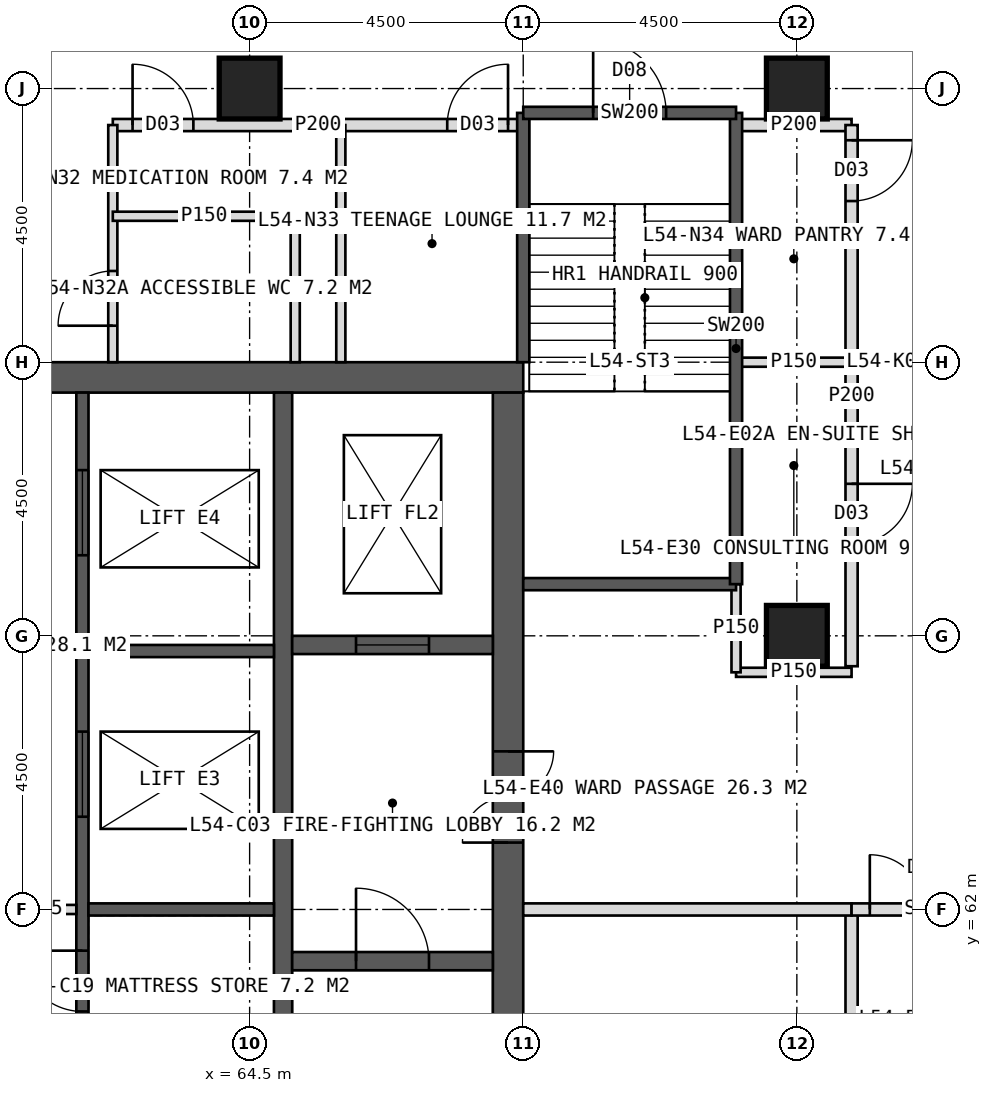
"""IFC4 building model, lengths in metres.
Left out: names, types, materials, properties, quantities, classifications, styles, units other than length and angle.
Written with IfcOpenShell. Run it as: python <this file> out.ifc"""

import sys

from ifc_helpers import new_model, si_unit, direction, frame, frame_2d, origin, origin_2d, place, context, subcontext, project, spatial, rectangle, hollow_rectangle, extrude, element, fill, save


model = new_model("IFC4")
c1 = context("Model", 3, precision=1e-05, world=origin(), true_north=direction((0.0, 1.0)))
c2 = subcontext(c1, "Body", "Model", "MODEL_VIEW")
j1 = project(units=[si_unit("LENGTHUNIT", "METRE"), si_unit("PLANEANGLEUNIT", "RADIAN")], contexts=[c1])
p1 = place(None, origin())
s1 = spatial("IfcSite", under=j1, at=p1, CompositionType="ELEMENT")
p2 = place(p1, origin())
s2 = spatial("IfcBuilding", under=s1, at=p2, CompositionType="ELEMENT")
p3 = place(p2, frame((0.0, 0.0, 225.0)))
s3 = spatial("IfcBuildingStorey", under=s2, at=p3, CompositionType="ELEMENT", Elevation=225.0)
p4 = place(p3, frame((51.0, 70.75, 0.0), z_axis=(0.0, 0.0, 1.0), x_axis=(1.0, 0.0, 0.0)))
e1 = element("IfcWall", 1, at=p4, inside=s3, PredefinedType="SHEAR", context=c2, shape_type="SweptSolid", body=[
    extrude(rectangle(XDim=18.0, YDim=0.5, at=frame_2d((9.0, 0.0))), origin(), (0.0, 0.0, 1.0), 4.0),
])
p5 = place(p4, frame((8.1, 0.0, 0.0)))
e2 = element("IfcOpeningElement", 2, at=p5, cuts=e1, PredefinedType="OPENING", context=c2, shape_type="SweptSolid", body=[
    extrude(rectangle(XDim=1.8, YDim=2.2, at=frame_2d((0.9, 1.1))), frame((0.0, 0.26, 0.0), z_axis=(0.0, -1.0, 0.0), x_axis=(1.0, 0.0, 0.0)), (0.0, 0.0, 1.0), 0.52),
])
p6 = place(p3, frame((68.75, 53.5, 0.0), z_axis=(0.0, 0.0, 1.0), x_axis=(0.0, 1.0, 0.0)))
e3 = element("IfcWall", 3, at=p6, inside=s3, PredefinedType="SHEAR", context=c2, shape_type="SweptSolid", body=[
    extrude(rectangle(XDim=17.0, YDim=0.5, at=frame_2d((8.5, 0.0))), origin(), (0.0, 0.0, 1.0), 4.0),
])
p7 = place(p6, frame((9.6, 0.0, 0.0)))
e4 = element("IfcOpeningElement", 4, at=p7, cuts=e3, PredefinedType="OPENING", context=c2, shape_type="SweptSolid", body=[
    extrude(rectangle(XDim=1.5, YDim=2.2, at=frame_2d((0.75, 1.1))), frame((0.0, 0.26, 0.0), z_axis=(0.0, -1.0, 0.0), x_axis=(1.0, 0.0, 0.0)), (0.0, 0.0, 1.0), 0.52),
])
p8 = place(p3, frame((65.05, 53.5, 0.0), z_axis=(0.0, 0.0, 1.0), x_axis=(0.0, 1.0, 0.0)))
e5 = element("IfcWall", 5, at=p8, inside=s3, PredefinedType="SHEAR", context=c2, shape_type="SweptSolid", body=[
    extrude(rectangle(XDim=17.0, YDim=0.3, at=frame_2d((8.5, 0.0))), origin(), (0.0, 0.0, 1.0), 4.0),
])
p9 = place(p3, frame((61.75, 53.5, 0.0), z_axis=(0.0, 0.0, 1.0), x_axis=(0.0, 1.0, 0.0)))
e6 = element("IfcWall", 6, at=p9, inside=s3, PredefinedType="SHEAR", context=c2, shape_type="SweptSolid", body=[
    extrude(rectangle(XDim=17.0, YDim=0.2, at=frame_2d((8.5, 0.0))), origin(), (0.0, 0.0, 1.0), 4.0),
])
p10 = place(p9, frame((0.808, 0.0, 0.0)))
e7 = element("IfcOpeningElement", 7, at=p10, cuts=e6, PredefinedType="OPENING", context=c2, shape_type="SweptSolid", body=[
    extrude(rectangle(XDim=1.0, YDim=2.1, at=frame_2d((0.5, 1.05))), frame((0.0, 0.11, 0.0), z_axis=(0.0, -1.0, 0.0), x_axis=(1.0, 0.0, 0.0)), (0.0, 0.0, 1.0), 0.22),
])
p11 = place(p9, frame((2.958, 0.0, 0.0)))
e8 = element("IfcOpeningElement", 8, at=p11, cuts=e6, PredefinedType="OPENING", context=c2, shape_type="SweptSolid", body=[
    extrude(rectangle(XDim=1.0, YDim=2.1, at=frame_2d((0.5, 1.05))), frame((0.0, 0.11, 0.0), z_axis=(0.0, -1.0, 0.0), x_axis=(1.0, 0.0, 0.0)), (0.0, 0.0, 1.0), 0.22),
])
p12 = place(p9, frame((4.722, 0.0, 0.0)))
e9 = element("IfcOpeningElement", 9, at=p12, cuts=e6, PredefinedType="OPENING", context=c2, shape_type="SweptSolid", body=[
    extrude(rectangle(XDim=1.0, YDim=2.1, at=frame_2d((0.5, 1.05))), frame((0.0, 0.11, 0.0), z_axis=(0.0, -1.0, 0.0), x_axis=(1.0, 0.0, 0.0)), (0.0, 0.0, 1.0), 0.22),
])
p13 = place(p9, frame((6.823, 0.0, 0.0)))
e10 = element("IfcOpeningElement", 10, at=p13, cuts=e6, PredefinedType="OPENING", context=c2, shape_type="SweptSolid", body=[
    extrude(rectangle(XDim=1.0, YDim=2.1, at=frame_2d((0.5, 1.05))), frame((0.0, 0.11, 0.0), z_axis=(0.0, -1.0, 0.0), x_axis=(1.0, 0.0, 0.0)), (0.0, 0.0, 1.0), 0.22),
])
p14 = place(p9, frame((10.025, 0.0, 0.0)))
e11 = element("IfcOpeningElement", 11, at=p14, cuts=e6, PredefinedType="OPENING", context=c2, shape_type="SweptSolid", body=[
    extrude(rectangle(XDim=1.4, YDim=2.2, at=frame_2d((0.7, 1.1))), frame((0.0, 0.11, 0.0), z_axis=(0.0, -1.0, 0.0), x_axis=(1.0, 0.0, 0.0)), (0.0, 0.0, 1.0), 0.22),
])
p15 = place(p9, frame((14.325, 0.0, 0.0)))
e12 = element("IfcOpeningElement", 12, at=p15, cuts=e6, PredefinedType="OPENING", context=c2, shape_type="SweptSolid", body=[
    extrude(rectangle(XDim=1.4, YDim=2.2, at=frame_2d((0.7, 1.1))), frame((0.0, 0.11, 0.0), z_axis=(0.0, -1.0, 0.0), x_axis=(1.0, 0.0, 0.0)), (0.0, 0.0, 1.0), 0.22),
])
for number, where, z_axis, x_axis in (
    (13, (61.85, 62.0, 0.0), (0.0, 0.0, 1.0), (1.0, 0.0, 0.0)),
    (14, (61.85, 66.25, 0.0), (0.0, 0.0, 1.0), (1.0, 0.0, 0.0)),
):
    element("IfcWall", number, at=place(p3, frame(where, z_axis=z_axis, x_axis=x_axis)), inside=s3, PredefinedType="SHEAR", context=c2, shape_type="SweptSolid", body=[
        extrude(rectangle(XDim=3.05, YDim=0.2, at=frame_2d((1.525, 0.0))), origin(), (0.0, 0.0, 1.0), 4.0),
    ])
p16 = place(p3, frame((65.2, 61.15, 0.0), z_axis=(0.0, 0.0, 1.0), x_axis=(1.0, 0.0, 0.0)))
e15 = element("IfcWall", 15, at=p16, inside=s3, PredefinedType="SHEAR", context=c2, shape_type="SweptSolid", body=[
    extrude(rectangle(XDim=3.3, YDim=0.3, at=frame_2d((1.65, 0.0))), origin(), (0.0, 0.0, 1.0), 4.0),
])
p17 = place(p16, frame((1.05, 0.0, 0.0)))
e16 = element("IfcOpeningElement", 16, at=p17, cuts=e15, PredefinedType="OPENING", context=c2, shape_type="SweptSolid", body=[
    extrude(rectangle(XDim=1.2, YDim=2.1, at=frame_2d((0.6, 1.05))), frame((0.0, 0.16, 0.0), z_axis=(0.0, -1.0, 0.0), x_axis=(1.0, 0.0, 0.0)), (0.0, 0.0, 1.0), 0.32),
])
p18 = place(p3, frame((65.2, 66.35, 0.0), z_axis=(0.0, 0.0, 1.0), x_axis=(1.0, 0.0, 0.0)))
e17 = element("IfcWall", 17, at=p18, inside=s3, PredefinedType="SHEAR", context=c2, shape_type="SweptSolid", body=[
    extrude(rectangle(XDim=3.3, YDim=0.3, at=frame_2d((1.65, 0.0))), origin(), (0.0, 0.0, 1.0), 4.0),
])
p19 = place(p18, frame((1.05, 0.0, 0.0)))
e18 = element("IfcOpeningElement", 18, at=p19, cuts=e17, PredefinedType="OPENING", context=c2, shape_type="SweptSolid", body=[
    extrude(rectangle(XDim=1.2, YDim=2.2, at=frame_2d((0.6, 1.1))), frame((0.0, 0.16, 0.0), z_axis=(0.0, -1.0, 0.0), x_axis=(1.0, 0.0, 0.0)), (0.0, 0.0, 1.0), 0.32),
])
for number, where, z_axis, x_axis in (
    (19, (73.5, 75.5, 0.0), (0.0, 0.0, 1.0), (1.0, 0.0, 0.0)),
    (20, (64.5, 75.5, 0.0), (0.0, 0.0, 1.0), (1.0, 0.0, 0.0)),
    (21, (73.5, 66.5, 0.0), (0.0, 0.0, 1.0), (1.0, 0.0, 0.0)),
):
    element("IfcColumn", number, at=place(p3, frame(where, z_axis=z_axis, x_axis=x_axis)), inside=s3, PredefinedType="COLUMN", context=c2, shape_type="SweptSolid", body=[
        extrude(hollow_rectangle(XDim=1.0, YDim=1.0, WallThickness=0.1, at=origin_2d()), origin(), (0.0, 0.0, 1.0), 4.0),
    ])
p20 = place(p3, frame((62.25, 74.9, 0.0), z_axis=(0.0, 0.0, 1.0), x_axis=(1.0, 0.0, 0.0)))
e22 = element("IfcWall", 22, at=p20, inside=s3, PredefinedType="PARTITIONING", context=c2, shape_type="SweptSolid", body=[
    extrude(rectangle(XDim=6.75, YDim=0.2, at=frame_2d((3.375, 0.0))), origin(), (0.0, 0.0, 1.0), 3.75),
])
p21 = place(p20, frame((0.325, 0.0, 0.0)))
e23 = element("IfcOpeningElement", 23, at=p21, cuts=e22, PredefinedType="OPENING", context=c2, shape_type="SweptSolid", body=[
    extrude(rectangle(XDim=1.0, YDim=2.1, at=frame_2d((0.5, 1.05))), frame((0.0, 0.11, 0.0), z_axis=(0.0, -1.0, 0.0), x_axis=(1.0, 0.0, 0.0)), (0.0, 0.0, 1.0), 0.22),
])
p22 = place(p20, frame((5.5, 0.0, 0.0)))
e24 = element("IfcOpeningElement", 24, at=p22, cuts=e22, PredefinedType="OPENING", context=c2, shape_type="SweptSolid", body=[
    extrude(rectangle(XDim=1.0, YDim=2.1, at=frame_2d((0.5, 1.05))), frame((0.0, 0.11, 0.0), z_axis=(0.0, -1.0, 0.0), x_axis=(1.0, 0.0, 0.0)), (0.0, 0.0, 1.0), 0.22),
])
p23 = place(p3, frame((72.5, 74.9, 0.0), z_axis=(0.0, 0.0, 1.0), x_axis=(1.0, 0.0, 0.0)))
e25 = element("IfcWall", 25, at=p23, inside=s3, PredefinedType="PARTITIONING", context=c2, shape_type="SweptSolid", body=[
    extrude(rectangle(XDim=1.9, YDim=0.2, at=frame_2d((0.95, 0.0))), origin(), (0.0, 0.0, 1.0), 3.75),
])
p24 = place(p3, frame((62.25, 71.0, 0.0), z_axis=(0.0, 0.0, 1.0), x_axis=(0.0, 1.0, 0.0)))
e26 = element("IfcWall", 26, at=p24, inside=s3, PredefinedType="PARTITIONING", context=c2, shape_type="SweptSolid", body=[
    extrude(rectangle(XDim=3.9, YDim=0.15, at=frame_2d((1.95, 0.0))), origin(), (0.0, 0.0, 1.0), 3.75),
])
p25 = place(p24, frame((0.6, 0.0, 0.0)))
e27 = element("IfcOpeningElement", 27, at=p25, cuts=e26, PredefinedType="OPENING", context=c2, shape_type="SweptSolid", body=[
    extrude(rectangle(XDim=0.9, YDim=2.1, at=frame_2d((0.45, 1.05))), frame((0.0, 0.085, 0.0), z_axis=(0.0, -1.0, 0.0), x_axis=(1.0, 0.0, 0.0)), (0.0, 0.0, 1.0), 0.17),
])
p26 = place(p3, frame((66.0, 71.0, 0.0), z_axis=(0.0, 0.0, 1.0), x_axis=(0.0, 1.0, 0.0)))
e28 = element("IfcWall", 28, at=p26, inside=s3, PredefinedType="PARTITIONING", context=c2, shape_type="SweptSolid", body=[
    extrude(rectangle(XDim=3.9, YDim=0.15, at=frame_2d((1.95, 0.0))), origin(), (0.0, 0.0, 1.0), 3.75),
])
p27 = place(p3, frame((62.25, 73.4, 0.0), z_axis=(0.0, 0.0, 1.0), x_axis=(1.0, 0.0, 0.0)))
e29 = element("IfcWall", 29, at=p27, inside=s3, PredefinedType="PARTITIONING", context=c2, shape_type="SweptSolid", body=[
    extrude(rectangle(XDim=3.0, YDim=0.15, at=frame_2d((1.5, 0.0))), origin(), (0.0, 0.0, 1.0), 3.75),
])
p28 = place(p3, frame((65.25, 71.0, 0.0), z_axis=(0.0, 0.0, 1.0), x_axis=(0.0, 1.0, 0.0)))
e30 = element("IfcWall", 30, at=p28, inside=s3, PredefinedType="PARTITIONING", context=c2, shape_type="SweptSolid", body=[
    extrude(rectangle(XDim=2.4, YDim=0.15, at=frame_2d((1.2, 0.0))), origin(), (0.0, 0.0, 1.0), 3.75),
])
p29 = place(p3, frame((72.5, 71.0, 0.0), z_axis=(0.0, 0.0, 1.0), x_axis=(1.0, 0.0, 0.0)))
e31 = element("IfcWall", 31, at=p29, inside=s3, PredefinedType="PARTITIONING", context=c2, shape_type="SweptSolid", body=[
    extrude(rectangle(XDim=1.9, YDim=0.15, at=frame_2d((0.95, 0.0))), origin(), (0.0, 0.0, 1.0), 3.75),
])
p30 = place(p3, frame((74.4, 74.9, 0.0), z_axis=(0.0, 0.0, 1.0), x_axis=(0.0, -1.0, 0.0)))
e32 = element("IfcWall", 32, at=p30, inside=s3, PredefinedType="PARTITIONING", context=c2, shape_type="SweptSolid", body=[
    extrude(rectangle(XDim=8.9, YDim=0.2, at=frame_2d((4.45, 0.0))), origin(), (0.0, 0.0, 1.0), 3.75),
])
p31 = place(p30, frame((0.25, 0.0, 0.0)))
e33 = element("IfcOpeningElement", 33, at=p31, cuts=e32, PredefinedType="OPENING", context=c2, shape_type="SweptSolid", body=[
    extrude(rectangle(XDim=1.0, YDim=2.1, at=frame_2d((0.5, 1.05))), frame((0.0, 0.11, 0.0), z_axis=(0.0, -1.0, 0.0), x_axis=(1.0, 0.0, 0.0)), (0.0, 0.0, 1.0), 0.22),
])
p32 = place(p30, frame((5.9, 0.0, 0.0)))
e34 = element("IfcOpeningElement", 34, at=p32, cuts=e32, PredefinedType="OPENING", context=c2, shape_type="SweptSolid", body=[
    extrude(rectangle(XDim=1.0, YDim=2.1, at=frame_2d((0.5, 1.05))), frame((0.0, 0.11, 0.0), z_axis=(0.0, -1.0, 0.0), x_axis=(1.0, 0.0, 0.0)), (0.0, 0.0, 1.0), 0.22),
])
p33 = place(p3, frame((74.4, 62.0, 0.0), z_axis=(0.0, 0.0, 1.0), x_axis=(0.0, -1.0, 0.0)))
e35 = element("IfcWall", 35, at=p33, inside=s3, PredefinedType="PARTITIONING", context=c2, shape_type="SweptSolid", body=[
    extrude(rectangle(XDim=14.4, YDim=0.2, at=frame_2d((7.2, 0.0))), origin(), (0.0, 0.0, 1.0), 3.75),
])
p34 = place(p33, frame((2.5, 0.0, 0.0)))
e36 = element("IfcOpeningElement", 36, at=p34, cuts=e35, PredefinedType="OPENING", context=c2, shape_type="SweptSolid", body=[
    extrude(rectangle(XDim=1.0, YDim=2.1, at=frame_2d((0.5, 1.05))), frame((0.0, 0.11, 0.0), z_axis=(0.0, -1.0, 0.0), x_axis=(1.0, 0.0, 0.0)), (0.0, 0.0, 1.0), 0.22),
])
p35 = place(p33, frame((7.0, 0.0, 0.0)))
e37 = element("IfcOpeningElement", 37, at=p35, cuts=e35, PredefinedType="OPENING", context=c2, shape_type="SweptSolid", body=[
    extrude(rectangle(XDim=1.0, YDim=2.1, at=frame_2d((0.5, 1.05))), frame((0.0, 0.11, 0.0), z_axis=(0.0, -1.0, 0.0), x_axis=(1.0, 0.0, 0.0)), (0.0, 0.0, 1.0), 0.22),
])
p36 = place(p33, frame((11.2, 0.0, 0.0)))
e38 = element("IfcOpeningElement", 38, at=p36, cuts=e35, PredefinedType="OPENING", context=c2, shape_type="SweptSolid", body=[
    extrude(rectangle(XDim=1.0, YDim=2.1, at=frame_2d((0.5, 1.05))), frame((0.0, 0.11, 0.0), z_axis=(0.0, -1.0, 0.0), x_axis=(1.0, 0.0, 0.0)), (0.0, 0.0, 1.0), 0.22),
])
p37 = place(p3, frame((72.5, 65.9, 0.0), z_axis=(0.0, 0.0, 1.0), x_axis=(1.0, 0.0, 0.0)))
e39 = element("IfcWall", 39, at=p37, inside=s3, PredefinedType="PARTITIONING", context=c2, shape_type="SweptSolid", body=[
    extrude(rectangle(XDim=1.9, YDim=0.15, at=frame_2d((0.95, 0.0))), origin(), (0.0, 0.0, 1.0), 3.75),
])
p38 = place(p3, frame((69.0, 62.0, 0.0), z_axis=(0.0, 0.0, 1.0), x_axis=(1.0, 0.0, 0.0)))
e40 = element("IfcWall", 40, at=p38, inside=s3, PredefinedType="SOLIDWALL", context=c2, shape_type="SweptSolid", body=[
    extrude(rectangle(XDim=5.4, YDim=0.2, at=frame_2d((2.7, 0.0))), origin(), (0.0, 0.0, 1.0), 2.95),
])
p39 = place(p3, frame((74.4, 62.0, 0.0), z_axis=(0.0, 0.0, 1.0), x_axis=(1.0, 0.0, 0.0)))
e41 = element("IfcWall", 41, at=p39, inside=s3, PredefinedType="SOLIDWALL", context=c2, shape_type="SweptSolid", body=[
    extrude(rectangle(XDim=2.7, YDim=0.2, at=frame_2d((1.35, 0.0))), origin(), (0.0, 0.0, 1.0), 2.95),
])
p40 = place(p39, frame((0.3, 0.0, 0.0)))
e42 = element("IfcOpeningElement", 42, at=p40, cuts=e41, PredefinedType="OPENING", context=c2, shape_type="SweptSolid", body=[
    extrude(rectangle(XDim=1.8, YDim=2.2, at=frame_2d((0.9, 1.1))), frame((0.0, 0.11, 0.0), z_axis=(0.0, -1.0, 0.0), x_axis=(1.0, 0.0, 0.0)), (0.0, 0.0, 1.0), 0.22),
])
p41 = place(p3, frame((58.35, 62.0, 0.0), z_axis=(0.0, 0.0, 1.0), x_axis=(1.0, 0.0, 0.0)))
e43 = element("IfcWall", 43, at=p41, inside=s3, PredefinedType="PARTITIONING", context=c2, shape_type="SweptSolid", body=[
    extrude(rectangle(XDim=3.3, YDim=0.15, at=frame_2d((1.65, 0.0))), origin(), (0.0, 0.0, 1.0), 3.75),
])
p42 = place(p3, frame((72.5, 65.9, 0.0), z_axis=(0.0, 0.0, 1.0), x_axis=(0.0, 1.0, 0.0)))
e44 = element("IfcWall", 44, at=p42, inside=s3, PredefinedType="PARTITIONING", context=c2, shape_type="SweptSolid", body=[
    extrude(rectangle(XDim=1.45, YDim=0.15, at=frame_2d((0.725, 0.0))), origin(), (0.0, 0.0, 1.0), 3.75),
])
p43 = place(p3, frame((69.0, 71.0, 0.0), z_axis=(0.0, 0.0, 1.0), x_axis=(0.0, 1.0, 0.0)))
e45 = element("IfcWall", 45, at=p43, inside=s3, PredefinedType="SOLIDWALL", context=c2, shape_type="SweptSolid", body=[
    extrude(rectangle(XDim=4.1, YDim=0.2, at=frame_2d((2.05, 0.0))), origin(), (0.0, 0.0, 1.0), 3.75),
])
p44 = place(p3, frame((69.0, 67.35, 0.0), z_axis=(0.0, 0.0, 1.0), x_axis=(1.0, 0.0, 0.0)))
e46 = element("IfcWall", 46, at=p44, inside=s3, PredefinedType="SOLIDWALL", context=c2, shape_type="SweptSolid", body=[
    extrude(rectangle(XDim=3.5, YDim=0.2, at=frame_2d((1.75, 0.0))), origin(), (0.0, 0.0, 1.0), 3.75),
])
p45 = place(p3, frame((72.5, 67.35, 0.0), z_axis=(0.0, 0.0, 1.0), x_axis=(0.0, 1.0, 0.0)))
e47 = element("IfcWall", 47, at=p45, inside=s3, PredefinedType="SOLIDWALL", context=c2, shape_type="SweptSolid", body=[
    extrude(rectangle(XDim=7.75, YDim=0.2, at=frame_2d((3.875, 0.0))), origin(), (0.0, 0.0, 1.0), 3.75),
])
p46 = place(p3, frame((69.0, 75.1, 0.0), z_axis=(0.0, 0.0, 1.0), x_axis=(1.0, 0.0, 0.0)))
e48 = element("IfcWall", 48, at=p46, inside=s3, PredefinedType="SOLIDWALL", context=c2, shape_type="SweptSolid", body=[
    extrude(rectangle(XDim=3.5, YDim=0.2, at=frame_2d((1.75, 0.0))), origin(), (0.0, 0.0, 1.0), 3.75),
])
p47 = place(p46, frame((1.15, 0.0, 0.0)))
e49 = element("IfcOpeningElement", 49, at=p47, cuts=e48, PredefinedType="OPENING", context=c2, shape_type="SweptSolid", body=[
    extrude(rectangle(XDim=1.2, YDim=2.1, at=frame_2d((0.6, 1.05))), frame((0.0, 0.11, 0.0), z_axis=(0.0, -1.0, 0.0), x_axis=(1.0, 0.0, 0.0)), (0.0, 0.0, 1.0), 0.22),
])
p48 = place(p25, origin())
e50 = element("IfcDoor", 50, at=p48, inside=s3, OperationType="SINGLE_SWING_LEFT", PredefinedType="DOOR", context=c2, shape_type="SweptSolid", body=[
    extrude(rectangle(XDim=0.9, YDim=2.1, at=frame_2d((0.45, 1.05))), frame((0.0, 0.025, 0.0), z_axis=(0.0, -1.0, 0.0), x_axis=(1.0, 0.0, 0.0)), (0.0, 0.0, 1.0), 0.05),
])
fill(e27, e50)
p49 = place(p21, origin())
e51 = element("IfcDoor", 51, at=p49, inside=s3, OperationType="SINGLE_SWING_LEFT", PredefinedType="DOOR", context=c2, shape_type="SweptSolid", body=[
    extrude(rectangle(XDim=1.0, YDim=2.1, at=frame_2d((0.5, 1.05))), frame((0.0, 0.025, 0.0), z_axis=(0.0, -1.0, 0.0), x_axis=(1.0, 0.0, 0.0)), (0.0, 0.0, 1.0), 0.05),
])
fill(e23, e51)
p50 = place(p22, origin())
e52 = element("IfcDoor", 52, at=p50, inside=s3, OperationType="SINGLE_SWING_RIGHT", PredefinedType="DOOR", context=c2, shape_type="SweptSolid", body=[
    extrude(rectangle(XDim=1.0, YDim=2.1, at=frame_2d((0.5, 1.05))), frame((0.0, 0.025, 0.0), z_axis=(0.0, -1.0, 0.0), x_axis=(1.0, 0.0, 0.0)), (0.0, 0.0, 1.0), 0.05),
])
fill(e24, e52)
p51 = place(p31, origin())
e53 = element("IfcDoor", 53, at=p51, inside=s3, OperationType="SINGLE_SWING_LEFT", PredefinedType="DOOR", context=c2, shape_type="SweptSolid", body=[
    extrude(rectangle(XDim=1.0, YDim=2.1, at=frame_2d((0.5, 1.05))), frame((0.0, 0.025, 0.0), z_axis=(0.0, -1.0, 0.0), x_axis=(1.0, 0.0, 0.0)), (0.0, 0.0, 1.0), 0.05),
])
fill(e33, e53)
p52 = place(p32, origin())
e54 = element("IfcDoor", 54, at=p52, inside=s3, OperationType="SINGLE_SWING_LEFT", PredefinedType="DOOR", context=c2, shape_type="SweptSolid", body=[
    extrude(rectangle(XDim=1.0, YDim=2.1, at=frame_2d((0.5, 1.05))), frame((0.0, 0.025, 0.0), z_axis=(0.0, -1.0, 0.0), x_axis=(1.0, 0.0, 0.0)), (0.0, 0.0, 1.0), 0.05),
])
fill(e34, e54)
p53 = place(p40, origin())
e55 = element("IfcDoor", 55, at=p53, inside=s3, OperationType="DOUBLE_DOOR_DOUBLE_SWING", PredefinedType="DOOR", context=c2, shape_type="SweptSolid", body=[
    extrude(rectangle(XDim=1.8, YDim=2.2, at=frame_2d((0.9, 1.1))), frame((0.0, 0.025, 0.0), z_axis=(0.0, -1.0, 0.0), x_axis=(1.0, 0.0, 0.0)), (0.0, 0.0, 1.0), 0.05),
])
fill(e42, e55)
p54 = place(p7, origin())
e56 = element("IfcDoor", 56, at=p54, inside=s3, OperationType="DOUBLE_DOOR_SINGLE_SWING", PredefinedType="DOOR", context=c2, shape_type="SweptSolid", body=[
    extrude(rectangle(XDim=1.5, YDim=2.2, at=frame_2d((0.75, 1.1))), frame((0.0, 0.025, 0.0), z_axis=(0.0, -1.0, 0.0), x_axis=(1.0, 0.0, 0.0)), (0.0, 0.0, 1.0), 0.05),
])
fill(e4, e56)
p55 = place(p17, origin())
e57 = element("IfcDoor", 57, at=p55, inside=s3, OperationType="SINGLE_SWING_LEFT", PredefinedType="DOOR", context=c2, shape_type="SweptSolid", body=[
    extrude(rectangle(XDim=1.2, YDim=2.1, at=frame_2d((0.6, 1.05))), frame((0.0, 0.025, 0.0), z_axis=(0.0, -1.0, 0.0), x_axis=(1.0, 0.0, 0.0)), (0.0, 0.0, 1.0), 0.05),
])
fill(e16, e57)
p56 = place(p19, origin())
e58 = element("IfcDoor", 58, at=p56, inside=s3, OperationType="SLIDING_TO_LEFT", PredefinedType="DOOR", context=c2, shape_type="SweptSolid", body=[
    extrude(rectangle(XDim=1.2, YDim=2.2, at=frame_2d((0.6, 1.1))), frame((0.0, 0.025, 0.0), z_axis=(0.0, -1.0, 0.0), x_axis=(1.0, 0.0, 0.0)), (0.0, 0.0, 1.0), 0.05),
])
fill(e18, e58)
p57 = place(p13, origin())
e59 = element("IfcDoor", 59, at=p57, inside=s3, OperationType="SINGLE_SWING_RIGHT", PredefinedType="DOOR", context=c2, shape_type="SweptSolid", body=[
    extrude(rectangle(XDim=1.0, YDim=2.1, at=frame_2d((0.5, 1.05))), frame((0.0, 0.025, 0.0), z_axis=(0.0, -1.0, 0.0), x_axis=(1.0, 0.0, 0.0)), (0.0, 0.0, 1.0), 0.05),
])
fill(e10, e59)
p58 = place(p14, origin())
e60 = element("IfcDoor", 60, at=p58, inside=s3, OperationType="SLIDING_TO_LEFT", PredefinedType="DOOR", context=c2, shape_type="SweptSolid", body=[
    extrude(rectangle(XDim=1.4, YDim=2.2, at=frame_2d((0.7, 1.1))), frame((0.0, 0.025, 0.0), z_axis=(0.0, -1.0, 0.0), x_axis=(1.0, 0.0, 0.0)), (0.0, 0.0, 1.0), 0.05),
])
fill(e11, e60)
p59 = place(p15, origin())
e61 = element("IfcDoor", 61, at=p59, inside=s3, OperationType="SLIDING_TO_LEFT", PredefinedType="DOOR", context=c2, shape_type="SweptSolid", body=[
    extrude(rectangle(XDim=1.4, YDim=2.2, at=frame_2d((0.7, 1.1))), frame((0.0, 0.025, 0.0), z_axis=(0.0, -1.0, 0.0), x_axis=(1.0, 0.0, 0.0)), (0.0, 0.0, 1.0), 0.05),
])
fill(e12, e61)
p60 = place(p47, origin())
e62 = element("IfcDoor", 62, at=p60, inside=s3, OperationType="SINGLE_SWING_LEFT", PredefinedType="DOOR", context=c2, shape_type="SweptSolid", body=[
    extrude(rectangle(XDim=1.2, YDim=2.1, at=frame_2d((0.6, 1.05))), frame((0.0, 0.025, 0.0), z_axis=(0.0, -1.0, 0.0), x_axis=(1.0, 0.0, 0.0)), (0.0, 0.0, 1.0), 0.05),
])
fill(e49, e62)
save(model, sys.argv[1])
